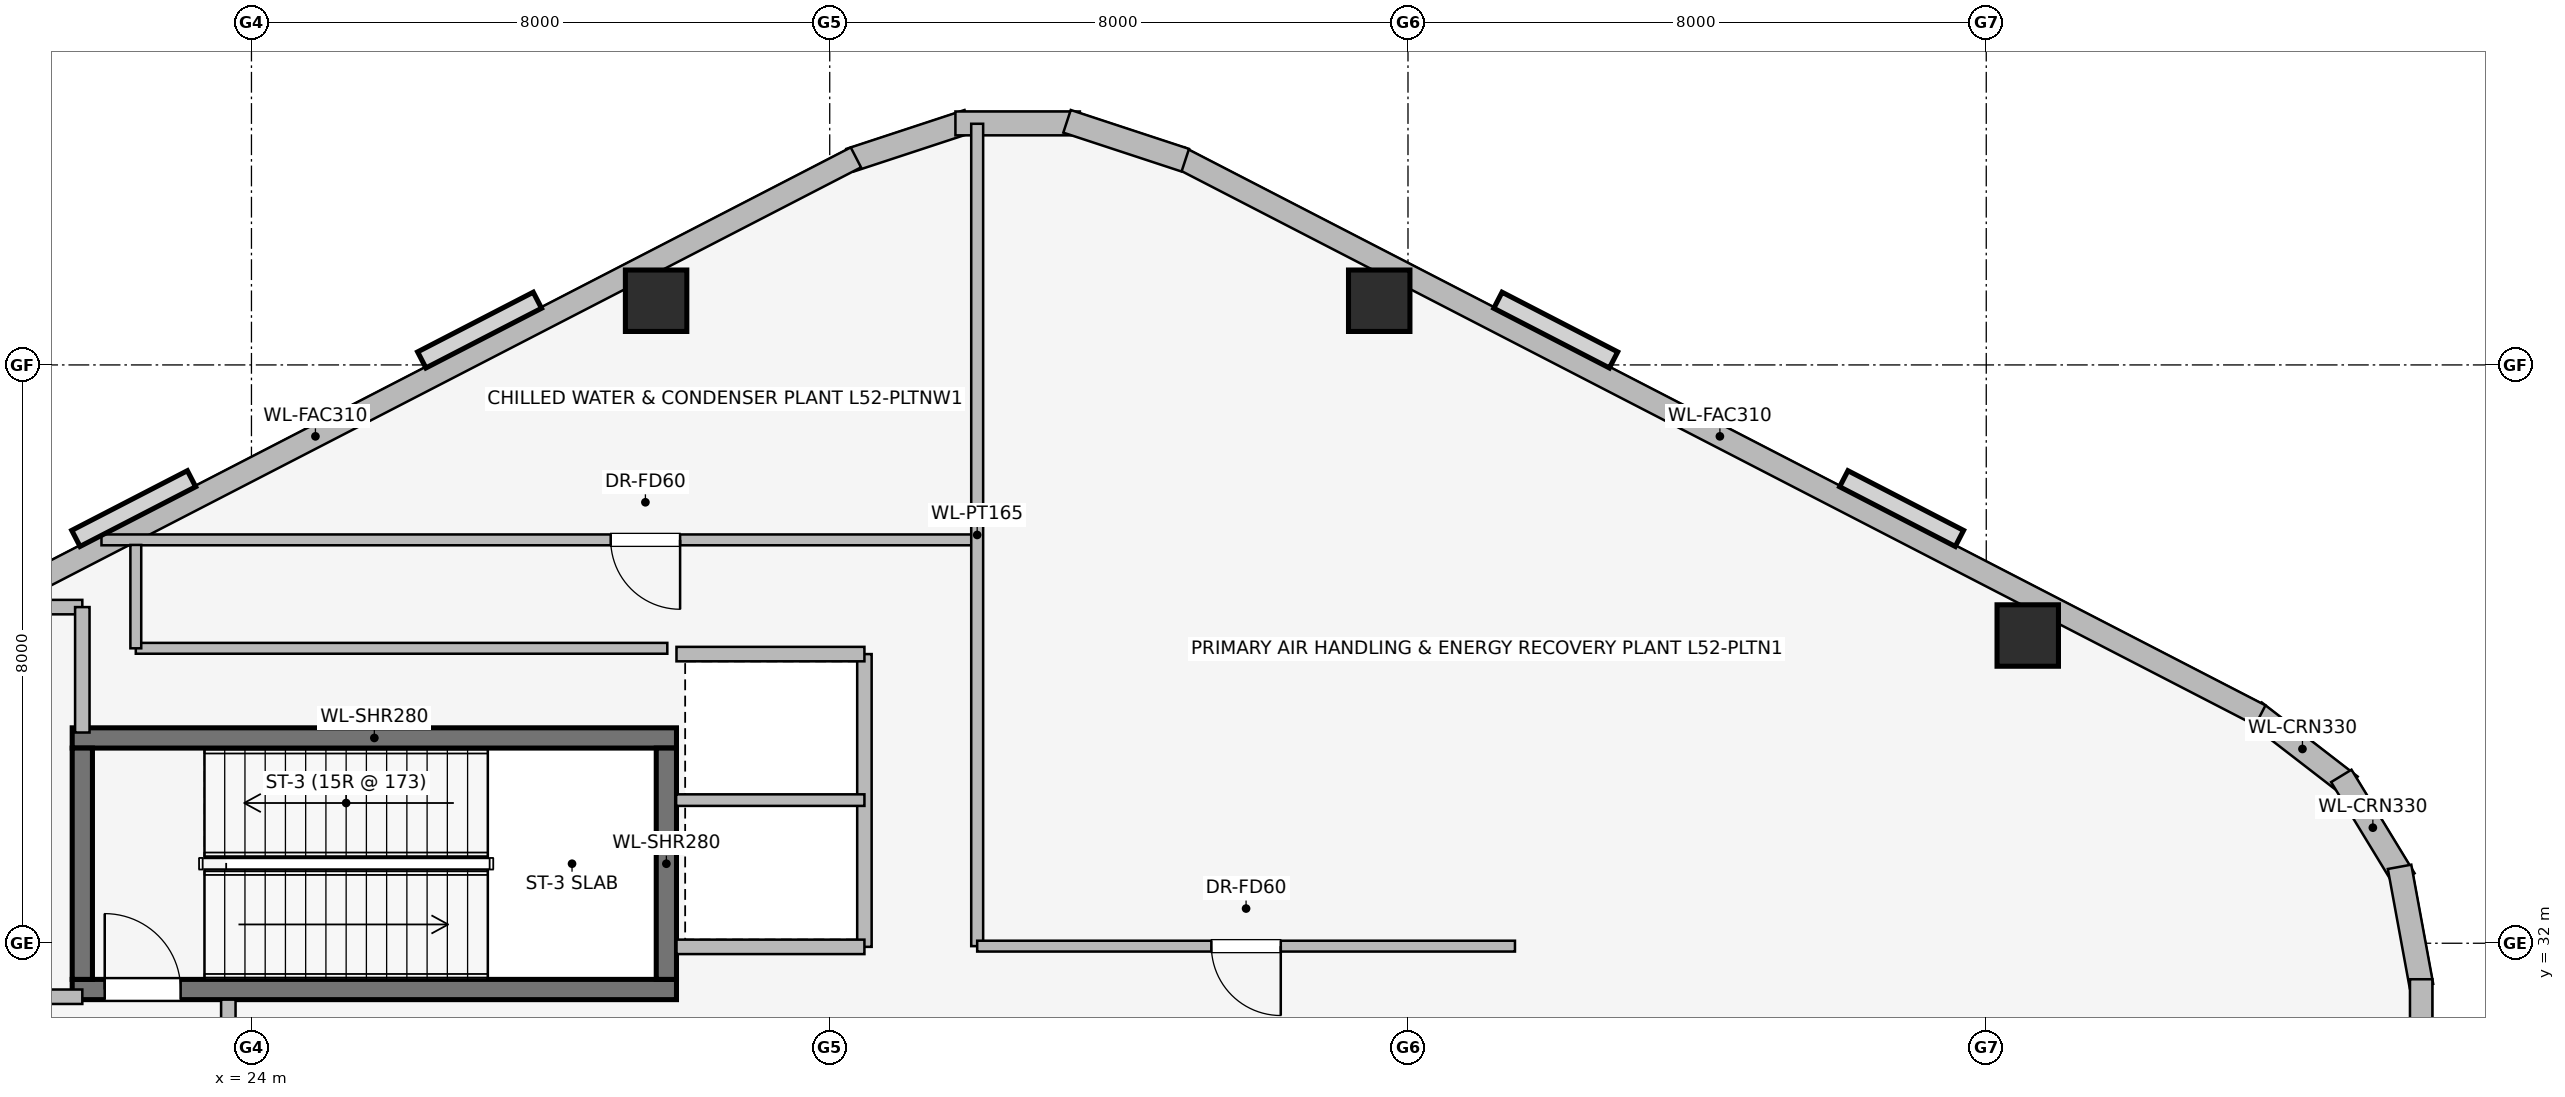
"""IFC4 building model, lengths in metres.
Left out: names, types, materials, properties, quantities, classifications, styles, units other than length and angle.
Written with IfcOpenShell. Run it as: python <this file> out.ifc"""

import sys

from ifc_helpers import new_model, si_unit, direction, frame, frame_2d, origin, origin_2d, place, context, subcontext, project, spatial, rectangle, extrude, element, fill, save


model = new_model("IFC4")
c1 = context("Model", 3, precision=1e-05, world=origin(), true_north=direction((0.0, 1.0)))
c2 = subcontext(c1, "Body", "Model", "MODEL_VIEW")
j1 = project(units=[si_unit("LENGTHUNIT", "METRE"), si_unit("PLANEANGLEUNIT", "RADIAN")], contexts=[c1])
p1 = place(None, origin())
s1 = spatial("IfcSite", under=j1, at=p1, CompositionType="ELEMENT")
p2 = place(p1, origin())
s2 = spatial("IfcBuilding", under=s1, at=p2, CompositionType="ELEMENT")
p3 = place(p2, frame((0.0, 0.0, 191.25)))
s3 = spatial("IfcBuildingStorey", under=s2, at=p3, CompositionType="ELEMENT", Elevation=191.25)
p4 = place(p3, frame((21.52, 31.36, 0.0), z_axis=(0.0, 0.0, 1.0), x_axis=(1.0, 0.0, 0.0)))
e1 = element("IfcWall", 1, at=p4, inside=s3, PredefinedType="SHEAR", context=c2, shape_type="SweptSolid", body=[
    extrude(rectangle(XDim=8.36, YDim=0.28, at=frame_2d((4.18, 0.0))), origin(), (0.0, 0.0, 1.0), 5.2),
])
p5 = place(p4, frame((0.45, 0.0, 0.0)))
e2 = element("IfcOpeningElement", 2, at=p5, cuts=e1, PredefinedType="OPENING", context=c2, shape_type="SweptSolid", body=[
    extrude(rectangle(XDim=1.05, YDim=2.0, at=frame_2d((0.525, 1.0))), frame((0.0, 0.15, 0.0), z_axis=(0.0, -1.0, 0.0), x_axis=(1.0, 0.0, 0.0)), (0.0, 0.0, 1.0), 0.3),
])
p6 = place(p3, frame((29.88, 34.84, 0.0), z_axis=(0.0, 0.0, 1.0), x_axis=(-1.0, 0.0, 0.0)))
e3 = element("IfcWall", 3, at=p6, inside=s3, PredefinedType="SHEAR", context=c2, shape_type="SweptSolid", body=[
    extrude(rectangle(XDim=8.36, YDim=0.28, at=frame_2d((4.18, 0.0))), origin(), (0.0, 0.0, 1.0), 5.2),
])
for number, where, z_axis, x_axis in (
    (4, (21.66, 34.7, 0.0), (0.0, 0.0, 1.0), (0.0, -1.0, 0.0)),
    (5, (29.74, 31.5, 0.0), (0.0, 0.0, 1.0), (0.0, 1.0, 0.0)),
):
    element("IfcWall", number, at=place(p3, frame(where, z_axis=z_axis, x_axis=x_axis)), inside=s3, PredefinedType="SHEAR", context=c2, shape_type="SweptSolid", body=[
        extrude(rectangle(XDim=3.2, YDim=0.28, at=frame_2d((1.6, 0.0))), origin(), (0.0, 0.0, 1.0), 5.2),
    ])
for number, where, z_axis, x_axis in (
    (6, (48.574, 36.257, 0.0), (0.0, 0.0, 1.0), (1.0, 0.0, 0.0)),
    (7, (39.602, 40.888, 0.0), (0.0, 0.0, 1.0), (1.0, 0.0, 0.0)),
    (8, (29.598, 40.888, 0.0), (0.0, 0.0, 1.0), (1.0, 0.0, 0.0)),
):
    element("IfcColumn", number, at=place(p3, frame(where, z_axis=z_axis, x_axis=x_axis)), inside=s3, PredefinedType="COLUMN", context=c2, shape_type="SweptSolid", body=[
        extrude(rectangle(XDim=0.85, YDim=0.85, at=origin_2d()), origin(), (0.0, 0.0, 1.0), 5.2),
    ])
p7 = place(p3, frame((51.711, 35.2, 0.0), z_axis=(0.0, 0.0, 1.0), x_axis=(0.791464279355, -0.611215423976, 0.0)))
e9 = element("IfcWall", 9, at=p7, inside=s3, PredefinedType="STANDARD", context=c2, shape_type="SweptSolid", body=[
    extrude(rectangle(XDim=1.677, YDim=0.33, at=frame_2d((0.838, 0.0))), origin(), (0.0, 0.0, 1.0), 4.94),
])
p8 = place(p3, frame((52.912, 34.315, 0.0), z_axis=(0.0, 0.0, 1.0), x_axis=(0.520219286058, -0.85403272444, 0.0)))
e10 = element("IfcWall", 10, at=p8, inside=s3, PredefinedType="STANDARD", context=c2, shape_type="SweptSolid", body=[
    extrude(rectangle(XDim=1.678, YDim=0.33, at=frame_2d((0.839, 0.0))), origin(), (0.0, 0.0, 1.0), 4.94),
])
p9 = place(p3, frame((53.718, 33.057, 0.0), z_axis=(0.0, 0.0, 1.0), x_axis=(0.180717642671, -0.983535019014, 0.0)))
e11 = element("IfcWall", 11, at=p9, inside=s3, PredefinedType="STANDARD", context=c2, shape_type="SweptSolid", body=[
    extrude(rectangle(XDim=1.677, YDim=0.33, at=frame_2d((0.838, 0.0))), origin(), (0.0, 0.0, 1.0), 4.94),
])
p10 = place(p3, frame((36.838, 42.871, 0.0), z_axis=(0.0, 0.0, 1.0), x_axis=(0.888626188278, -0.458632202867, 0.0)))
e12 = element("IfcWall", 12, at=p10, inside=s3, PredefinedType="STANDARD", context=c2, shape_type="SweptSolid", body=[
    extrude(rectangle(XDim=16.828, YDim=0.31, at=frame_2d((8.414, 0.0))), origin(), (0.0, 0.0, 1.0), 4.94),
])
p11 = place(p3, frame((32.281, 42.832, 0.0), z_axis=(0.0, 0.0, 1.0), x_axis=(0.949937416267, 0.312440242569, 0.0)))
e13 = element("IfcWall", 13, at=p11, inside=s3, PredefinedType="STANDARD", context=c2, shape_type="SweptSolid", body=[
    extrude(rectangle(XDim=1.722, YDim=0.33, at=frame_2d((0.861, 0.0))), origin(), (0.0, 0.0, 1.0), 4.94),
])
p12 = place(p3, frame((33.739, 43.341, 0.0), z_axis=(0.0, 0.0, 1.0), x_axis=(1.0, 0.0, 0.0)))
e14 = element("IfcWall", 14, at=p12, inside=s3, PredefinedType="STANDARD", context=c2, shape_type="SweptSolid", body=[
    extrude(rectangle(XDim=1.722, YDim=0.33, at=frame_2d((0.861, 0.0))), origin(), (0.0, 0.0, 1.0), 4.94),
])
p13 = place(p3, frame((35.283, 43.37, 0.0), z_axis=(0.0, 0.0, 1.0), x_axis=(0.949937416267, -0.312440242569, 0.0)))
e15 = element("IfcWall", 15, at=p13, inside=s3, PredefinedType="STANDARD", context=c2, shape_type="SweptSolid", body=[
    extrude(rectangle(XDim=1.722, YDim=0.33, at=frame_2d((0.861, 0.0))), origin(), (0.0, 0.0, 1.0), 4.94),
])
p14 = place(p3, frame((17.408, 35.153, 0.0), z_axis=(0.0, 0.0, 1.0), x_axis=(0.888626188278, 0.458632202867, 0.0)))
e16 = element("IfcWall", 16, at=p14, inside=s3, PredefinedType="STANDARD", context=c2, shape_type="SweptSolid", body=[
    extrude(rectangle(XDim=16.828, YDim=0.31, at=frame_2d((8.414, 0.0))), origin(), (0.0, 0.0, 1.0), 4.94),
])
p15 = place(p3, frame((54.017, 31.502, 0.0), z_axis=(0.0, 0.0, 1.0), x_axis=(0.0, -1.0, 0.0)))
e17 = element("IfcWall", 17, at=p15, inside=s3, PredefinedType="STANDARD", context=c2, shape_type="SweptSolid", body=[
    extrude(rectangle(XDim=15.004, YDim=0.31, at=frame_2d((7.502, 0.0))), origin(), (0.0, 0.0, 1.0), 4.94),
])
p16 = place(p3, frame((23.68, 25.68, 0.0), z_axis=(0.0, 0.0, 1.0), x_axis=(0.0, 1.0, 0.0)))
e18 = element("IfcWall", 18, at=p16, inside=s3, PredefinedType="PARTITIONING", context=c2, shape_type="SweptSolid", body=[
    extrude(rectangle(XDim=5.54, YDim=0.2, at=frame_2d((2.77, 0.0))), origin(), (0.0, 0.0, 1.0), 4.94),
])
p17 = place(p16, frame((1.8, 0.0, 0.0)))
e19 = element("IfcOpeningElement", 19, at=p17, cuts=e18, PredefinedType="OPENING", context=c2, shape_type="SweptSolid", body=[
    extrude(rectangle(XDim=1.05, YDim=2.0, at=frame_2d((0.525, 1.0))), frame((0.0, 0.11, 0.0), z_axis=(0.0, -1.0, 0.0), x_axis=(1.0, 0.0, 0.0)), (0.0, 0.0, 1.0), 0.22),
])
p18 = place(p3, frame((21.66, 31.26, 0.0), z_axis=(0.0, 0.0, 1.0), x_axis=(-1.0, 0.0, 0.0)))
e20 = element("IfcWall", 20, at=p18, inside=s3, PredefinedType="PARTITIONING", context=c2, shape_type="SweptSolid", body=[
    extrude(rectangle(XDim=2.01, YDim=0.2, at=frame_2d((1.005, 0.0))), origin(), (0.0, 0.0, 1.0), 4.94),
])
p19 = place(p18, frame((0.45, 0.0, 0.0)))
e21 = element("IfcOpeningElement", 21, at=p19, cuts=e20, PredefinedType="OPENING", context=c2, shape_type="SweptSolid", body=[
    extrude(rectangle(XDim=1.05, YDim=2.0, at=frame_2d((0.525, 1.0))), frame((0.0, 0.11, 0.0), z_axis=(0.0, -1.0, 0.0), x_axis=(1.0, 0.0, 0.0)), (0.0, 0.0, 1.0), 0.22),
])
p20 = place(p3, frame((32.48, 31.95, 0.0), z_axis=(0.0, 0.0, 1.0), x_axis=(0.0, 1.0, 0.0)))
e22 = element("IfcWall", 22, at=p20, inside=s3, PredefinedType="PARTITIONING", context=c2, shape_type="SweptSolid", body=[
    extrude(rectangle(XDim=4.05, YDim=0.2, at=frame_2d((2.025, 0.0))), origin(), (0.0, 0.0, 1.0), 4.94),
])
for number, where, z_axis, x_axis in (
    (23, (29.88, 36.0, 0.0), (0.0, 0.0, 1.0), (1.0, 0.0, 0.0)),
    (24, (32.48, 31.95, 0.0), (0.0, 0.0, 1.0), (-1.0, 0.0, 0.0)),
):
    element("IfcWall", number, at=place(p3, frame(where, z_axis=z_axis, x_axis=x_axis)), inside=s3, PredefinedType="PARTITIONING", context=c2, shape_type="SweptSolid", body=[
        extrude(rectangle(XDim=2.6, YDim=0.2, at=frame_2d((1.3, 0.0))), origin(), (0.0, 0.0, 1.0), 4.94),
    ])
p21 = place(p3, frame((29.875, 33.98, 0.0), z_axis=(0.0, 0.0, 1.0), x_axis=(1.0, 0.0, 0.0)))
e25 = element("IfcWall", 25, at=p21, inside=s3, PredefinedType="PARTITIONING", context=c2, shape_type="SweptSolid", body=[
    extrude(rectangle(XDim=2.605, YDim=0.16, at=frame_2d((1.302, 0.0))), origin(), (0.0, 0.0, 1.0), 4.94),
])
p22 = place(p3, frame((21.66, 36.65, 0.0), z_axis=(0.0, 0.0, 1.0), x_axis=(-1.0, 0.0, 0.0)))
e26 = element("IfcWall", 26, at=p22, inside=s3, PredefinedType="PARTITIONING", context=c2, shape_type="SweptSolid", body=[
    extrude(rectangle(XDim=1.406, YDim=0.2, at=frame_2d((0.703, 0.0))), origin(), (0.0, 0.0, 1.0), 4.94),
])
p23 = place(p3, frame((21.66, 34.915, 0.0), z_axis=(0.0, 0.0, 1.0), x_axis=(0.0, 1.0, 0.0)))
e27 = element("IfcWall", 27, at=p23, inside=s3, PredefinedType="PARTITIONING", context=c2, shape_type="SweptSolid", body=[
    extrude(rectangle(XDim=1.735, YDim=0.2, at=frame_2d((0.867, 0.0))), origin(), (0.0, 0.0, 1.0), 4.94),
])
p24 = place(p3, frame((34.0, 37.58, 0.0), z_axis=(0.0, 0.0, 1.0), x_axis=(-1.0, 0.0, 0.0)))
e28 = element("IfcWall", 28, at=p24, inside=s3, PredefinedType="PARTITIONING", context=c2, shape_type="SweptSolid", body=[
    extrude(rectangle(XDim=12.075, YDim=0.15, at=frame_2d((6.038, 0.0))), origin(), (0.0, 0.0, 1.0), 4.94),
])
p25 = place(p24, frame((4.07, 0.0, 0.0)))
e29 = element("IfcOpeningElement", 29, at=p25, cuts=e28, PredefinedType="OPENING", context=c2, shape_type="SweptSolid", body=[
    extrude(rectangle(XDim=0.96, YDim=2.0, at=frame_2d((0.48, 1.0))), frame((0.0, 0.085, 0.0), z_axis=(0.0, -1.0, 0.0), x_axis=(1.0, 0.0, 0.0)), (0.0, 0.0, 1.0), 0.17),
])
p26 = place(p3, frame((34.04, 31.96, 0.0), z_axis=(0.0, 0.0, 1.0), x_axis=(0.0, 1.0, 0.0)))
e30 = element("IfcWall", 30, at=p26, inside=s3, PredefinedType="PARTITIONING", context=c2, shape_type="SweptSolid", body=[
    extrude(rectangle(XDim=11.376, YDim=0.165, at=frame_2d((5.688, 0.0))), origin(), (0.0, 0.0, 1.0), 4.94),
])
p27 = place(p3, frame((41.48, 31.96, 0.0), z_axis=(0.0, 0.0, 1.0), x_axis=(-1.0, 0.0, 0.0)))
e31 = element("IfcWall", 31, at=p27, inside=s3, PredefinedType="PARTITIONING", context=c2, shape_type="SweptSolid", body=[
    extrude(rectangle(XDim=7.44, YDim=0.15, at=frame_2d((3.72, 0.0))), origin(), (0.0, 0.0, 1.0), 4.94),
])
p28 = place(p27, frame((3.24, 0.0, 0.0)))
e32 = element("IfcOpeningElement", 32, at=p28, cuts=e31, PredefinedType="OPENING", context=c2, shape_type="SweptSolid", body=[
    extrude(rectangle(XDim=0.96, YDim=2.0, at=frame_2d((0.48, 1.0))), frame((0.0, 0.085, 0.0), z_axis=(0.0, -1.0, 0.0), x_axis=(1.0, 0.0, 0.0)), (0.0, 0.0, 1.0), 0.17),
])
p29 = place(p3, frame((29.753, 36.08, 0.0), z_axis=(0.0, 0.0, 1.0), x_axis=(-1.0, 0.0, 0.0)))
e33 = element("IfcWall", 33, at=p29, inside=s3, PredefinedType="PARTITIONING", context=c2, shape_type="SweptSolid", body=[
    extrude(rectangle(XDim=7.353, YDim=0.15, at=frame_2d((3.677, 0.0))), origin(), (0.0, 0.0, 1.0), 4.94),
])
p30 = place(p3, frame((22.4, 36.08, 0.0), z_axis=(0.0, 0.0, 1.0), x_axis=(0.0, 1.0, 0.0)))
e34 = element("IfcWall", 34, at=p30, inside=s3, PredefinedType="PARTITIONING", context=c2, shape_type="SweptSolid", body=[
    extrude(rectangle(XDim=1.43, YDim=0.15, at=frame_2d((0.715, 0.0))), origin(), (0.0, 0.0, 1.0), 4.94),
])
p31 = place(p5, origin())
e35 = element("IfcDoor", 35, at=p31, inside=s3, OperationType="SINGLE_SWING_LEFT", PredefinedType="DOOR", context=c2, shape_type="SweptSolid", body=[
    extrude(rectangle(XDim=1.05, YDim=2.0, at=frame_2d((0.525, 1.0))), frame((0.0, 0.025, 0.0), z_axis=(0.0, -1.0, 0.0), x_axis=(1.0, 0.0, 0.0)), (0.0, 0.0, 1.0), 0.05),
])
fill(e2, e35)
p32 = place(p25, origin())
e36 = element("IfcDoor", 36, at=p32, inside=s3, OperationType="SINGLE_SWING_LEFT", PredefinedType="DOOR", context=c2, shape_type="SweptSolid", body=[
    extrude(rectangle(XDim=0.96, YDim=2.0, at=frame_2d((0.48, 1.0))), frame((0.0, 0.025, 0.0), z_axis=(0.0, -1.0, 0.0), x_axis=(1.0, 0.0, 0.0)), (0.0, 0.0, 1.0), 0.05),
])
fill(e29, e36)
p33 = place(p28, origin())
e37 = element("IfcDoor", 37, at=p33, inside=s3, OperationType="SINGLE_SWING_LEFT", PredefinedType="DOOR", context=c2, shape_type="SweptSolid", body=[
    extrude(rectangle(XDim=0.96, YDim=2.0, at=frame_2d((0.48, 1.0))), frame((0.0, 0.025, 0.0), z_axis=(0.0, -1.0, 0.0), x_axis=(1.0, 0.0, 0.0)), (0.0, 0.0, 1.0), 0.05),
])
fill(e32, e37)
save(model, sys.argv[1])
